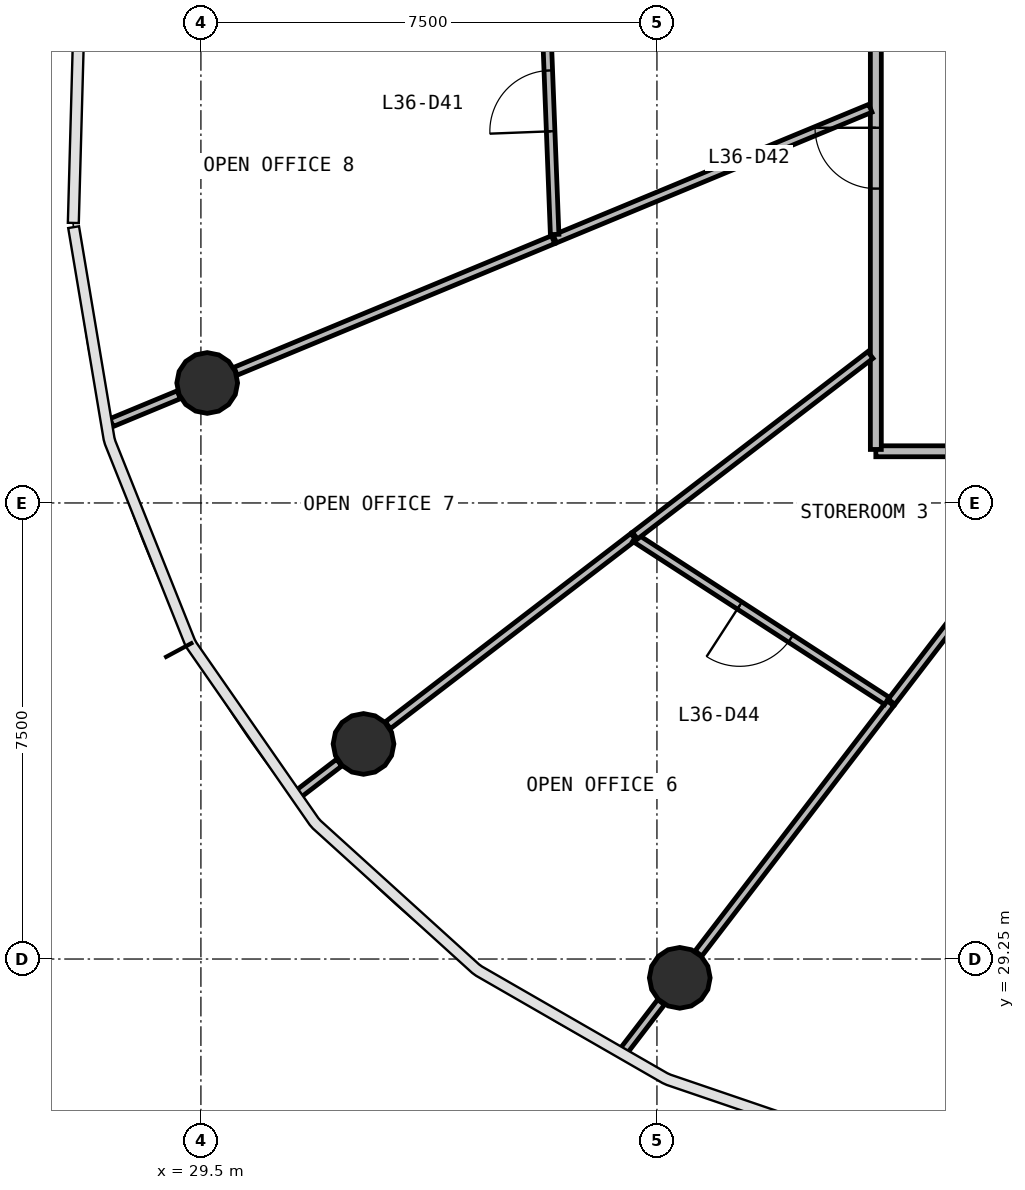
"""IFC4 building model, lengths in metres.
Left out: names, types, materials, properties, quantities, classifications, styles, units other than length and angle.
Written with IfcOpenShell. Run it as: python <this file> out.ifc"""

import sys

from ifc_helpers import new_model, si_unit, direction, frame, frame_2d, origin, origin_2d, place, context, subcontext, project, spatial, rectangle, circle, extrude, source, transform, mapped, element, fill, save


model = new_model("IFC4")
c1 = context("Model", 3, precision=1e-05, world=origin(), true_north=direction((0.0, 1.0)))
c2 = subcontext(c1, "Body", "Model", "MODEL_VIEW")
j1 = project(units=[si_unit("LENGTHUNIT", "METRE"), si_unit("PLANEANGLEUNIT", "RADIAN")], contexts=[c1])
p1 = place(None, origin())
s1 = spatial("IfcSite", under=j1, at=p1, CompositionType="ELEMENT")
p2 = place(p1, origin())
s2 = spatial("IfcBuilding", under=s1, at=p2, CompositionType="ELEMENT")
p3 = place(p2, frame((0.0, 0.0, 152.6)))
s3 = spatial("IfcBuildingStorey", under=s2, at=p3, CompositionType="ELEMENT", Elevation=152.6)
m1 = source(origin(), c2, "Body", "SweptSolid", [
    extrude(circle(Radius=0.5, at=origin_2d()), origin(), (0.0, 0.0, 1.0), 3.9),
])
for number, where, z_axis, x_axis in (
    (1, (29.603, 38.723, 0.0), (0.0, 0.0, 1.0), (1.0, 0.0, 0.0)),
    (2, (32.174, 32.787, 0.0), (0.0, 0.0, 1.0), (1.0, 0.0, 0.0)),
    (3, (37.375, 28.94, 0.0), (0.0, 0.0, 1.0), (1.0, 0.0, 0.0)),
):
    element("IfcColumn", number, at=place(p3, frame(where, z_axis=z_axis, x_axis=x_axis)), inside=s3, PredefinedType="COLUMN", context=c2, shape_type="MappedRepresentation", body=[
        mapped(m1, transform((0.0, 0.0, 0.0), scale=1.0)),
    ])
p4 = place(p3, frame((63.4, 37.6, 0.0), z_axis=(0.0, 0.0, 1.0), x_axis=(-1.0, 0.0, 0.0)))
e4 = element("IfcWall", 4, at=p4, inside=s3, PredefinedType="PARTITIONING", context=c2, shape_type="SweptSolid", body=[
    extrude(rectangle(XDim=22.8, YDim=0.18, at=frame_2d((11.4, 0.0))), origin(), (0.0, 0.0, 1.0), 2.88),
])
p5 = place(p4, frame((16.05, 0.0, 0.0)))
e5 = element("IfcOpeningElement", 5, at=p5, cuts=e4, PredefinedType="OPENING", context=c2, shape_type="SweptSolid", body=[
    extrude(rectangle(XDim=0.9, YDim=2.1, at=frame_2d((0.45, 1.05))), frame((0.0, 0.1, 0.0), z_axis=(0.0, -1.0, 0.0), x_axis=(1.0, 0.0, 0.0)), (0.0, 0.0, 1.0), 0.2),
])
p6 = place(p4, frame((13.05, 0.0, 0.0)))
e6 = element("IfcOpeningElement", 6, at=p6, cuts=e4, PredefinedType="OPENING", context=c2, shape_type="SweptSolid", body=[
    extrude(rectangle(XDim=0.9, YDim=2.1, at=frame_2d((0.45, 1.05))), frame((0.0, 0.1, 0.0), z_axis=(0.0, -1.0, 0.0), x_axis=(1.0, 0.0, 0.0)), (0.0, 0.0, 1.0), 0.2),
])
p7 = place(p4, frame((10.95, 0.0, 0.0)))
e7 = element("IfcOpeningElement", 7, at=p7, cuts=e4, PredefinedType="OPENING", context=c2, shape_type="SweptSolid", body=[
    extrude(rectangle(XDim=1.0, YDim=2.1, at=frame_2d((0.5, 1.05))), frame((0.0, 0.1, 0.0), z_axis=(0.0, -1.0, 0.0), x_axis=(1.0, 0.0, 0.0)), (0.0, 0.0, 1.0), 0.2),
])
p8 = place(p4, frame((19.95, 0.0, 0.0)))
e8 = element("IfcOpeningElement", 8, at=p8, cuts=e4, PredefinedType="OPENING", context=c2, shape_type="SweptSolid", body=[
    extrude(rectangle(XDim=1.0, YDim=2.1, at=frame_2d((0.5, 1.05))), frame((0.0, 0.1, 0.0), z_axis=(0.0, -1.0, 0.0), x_axis=(1.0, 0.0, 0.0)), (0.0, 0.0, 1.0), 0.2),
])
p9 = place(p3, frame((40.6, 37.63, 0.0), z_axis=(0.0, 0.0, 1.0), x_axis=(0.0, 1.0, 0.0)))
e9 = element("IfcWall", 9, at=p9, inside=s3, PredefinedType="PARTITIONING", context=c2, shape_type="SweptSolid", body=[
    extrude(rectangle(XDim=20.74, YDim=0.18, at=frame_2d((10.37, 0.0))), origin(), (0.0, 0.0, 1.0), 2.88),
])
p10 = place(p9, frame((9.89, 0.0, 0.0)))
e10 = element("IfcOpeningElement", 10, at=p10, cuts=e9, PredefinedType="OPENING", context=c2, shape_type="SweptSolid", body=[
    extrude(rectangle(XDim=1.0, YDim=2.1, at=frame_2d((0.5, 1.05))), frame((0.0, 0.1, 0.0), z_axis=(0.0, -1.0, 0.0), x_axis=(1.0, 0.0, 0.0)), (0.0, 0.0, 1.0), 0.2),
])
p11 = place(p9, frame((4.29, 0.0, 0.0)))
e11 = element("IfcOpeningElement", 11, at=p11, cuts=e9, PredefinedType="OPENING", context=c2, shape_type="SweptSolid", body=[
    extrude(rectangle(XDim=1.0, YDim=2.1, at=frame_2d((0.5, 1.05))), frame((0.0, 0.1, 0.0), z_axis=(0.0, -1.0, 0.0), x_axis=(1.0, 0.0, 0.0)), (0.0, 0.0, 1.0), 0.2),
])
p12 = place(p3, frame((40.51, 43.241, 0.0), z_axis=(0.0, 0.0, 1.0), x_axis=(-0.92387220975, -0.382701110597, 0.0)))
e12 = element("IfcWall", 12, at=p12, inside=s3, PredefinedType="PARTITIONING", context=c2, shape_type="SweptSolid", body=[
    extrude(rectangle(XDim=5.617, YDim=0.14, at=frame_2d((2.809, 0.0))), origin(), (0.0, 0.0, 1.0), 2.88),
])
p13 = place(p3, frame((35.293, 41.08, 0.0), z_axis=(0.0, 0.0, 1.0), x_axis=(-0.923883666289, -0.38267345239, 0.0)))
e13 = element("IfcWall", 13, at=p13, inside=s3, PredefinedType="PARTITIONING", context=c2, shape_type="SweptSolid", body=[
    extrude(rectangle(XDim=5.653, YDim=0.14, at=frame_2d((2.827, 0.0))), origin(), (0.0, 0.0, 1.0), 2.88),
])
p14 = place(p3, frame((40.841, 33.457, 0.0), z_axis=(0.0, 0.0, 1.0), x_axis=(-0.608780216018, -0.793338924159, 0.0)))
e14 = element("IfcWall", 14, at=p14, inside=s3, PredefinedType="PARTITIONING", context=c2, shape_type="SweptSolid", body=[
    extrude(rectangle(XDim=5.188, YDim=0.14, at=frame_2d((2.594, 0.0))), origin(), (0.0, 0.0, 1.0), 2.88),
])
p15 = place(p3, frame((36.614, 36.194, 0.0), z_axis=(0.0, 0.0, 1.0), x_axis=(-0.79337017358, -0.608739490811, 0.0)))
e15 = element("IfcWall", 15, at=p15, inside=s3, PredefinedType="PARTITIONING", context=c2, shape_type="SweptSolid", body=[
    extrude(rectangle(XDim=5.092, YDim=0.14, at=frame_2d((2.546, 0.0))), origin(), (0.0, 0.0, 1.0), 2.88),
])
p16 = place(p3, frame((40.782, 33.495, 0.0), z_axis=(0.0, 0.0, 1.0), x_axis=(-0.839336490457, 0.543612229247, 0.0)))
e16 = element("IfcWall", 16, at=p16, inside=s3, PredefinedType="PARTITIONING", context=c2, shape_type="SweptSolid", body=[
    extrude(rectangle(XDim=4.935, YDim=0.14, at=frame_2d((2.468, 0.0))), origin(), (0.0, 0.0, 1.0), 2.88),
])
p17 = place(p16, frame((1.885, 0.0, 0.0)))
e17 = element("IfcOpeningElement", 17, at=p17, cuts=e16, PredefinedType="OPENING", context=c2, shape_type="SweptSolid", body=[
    extrude(rectangle(XDim=1.0, YDim=2.1, at=frame_2d((0.5, 1.05))), frame((0.0, 0.08, 0.0), z_axis=(0.0, -1.0, 0.0), x_axis=(1.0, 0.0, 0.0)), (0.0, 0.0, 1.0), 0.16),
])
p18 = place(p3, frame((40.51, 39.183, 0.0), z_axis=(0.0, 0.0, 1.0), x_axis=(-0.793354275357, -0.608760210405, 0.0)))
e18 = element("IfcWall", 18, at=p18, inside=s3, PredefinedType="PARTITIONING", context=c2, shape_type="SweptSolid", body=[
    extrude(rectangle(XDim=4.88, YDim=0.14, at=frame_2d((2.44, 0.0))), origin(), (0.0, 0.0, 1.0), 2.88),
])
p19 = place(p3, frame((35.318, 41.166, 0.0), z_axis=(0.0, 0.0, 1.0), x_axis=(-0.038760942668, 0.999248512295, 0.0)))
e19 = element("IfcWall", 19, at=p19, inside=s3, PredefinedType="PARTITIONING", context=c2, shape_type="SweptSolid", body=[
    extrude(rectangle(XDim=4.548, YDim=0.14, at=frame_2d((2.274, 0.0))), origin(), (0.0, 0.0, 1.0), 2.88),
])
p20 = place(p19, frame((1.698, 0.0, 0.0)))
e20 = element("IfcOpeningElement", 20, at=p20, cuts=e19, PredefinedType="OPENING", context=c2, shape_type="SweptSolid", body=[
    extrude(rectangle(XDim=1.0, YDim=2.1, at=frame_2d((0.5, 1.05))), frame((0.0, 0.08, 0.0), z_axis=(0.0, -1.0, 0.0), x_axis=(1.0, 0.0, 0.0)), (0.0, 0.0, 1.0), 0.16),
])
p21 = place(p3, frame((42.033, 35.011, 0.0), z_axis=(0.0, 0.0, 1.0), x_axis=(-0.608750262105, -0.793361908833, 0.0)))
e21 = element("IfcWall", 21, at=p21, inside=s3, PredefinedType="PARTITIONING", context=c2, shape_type="SweptSolid", body=[
    extrude(rectangle(XDim=1.929, YDim=0.14, at=frame_2d((0.965, 0.0))), origin(), (0.0, 0.0, 1.0), 2.88),
])
p22 = place(p3, frame((29.137, 38.53, 0.0), z_axis=(0.0, 0.0, 1.0), x_axis=(-0.923882723383, -0.382675728829, 0.0)))
e22 = element("IfcWall", 22, at=p22, inside=s3, PredefinedType="PARTITIONING", context=c2, shape_type="SweptSolid", body=[
    extrude(rectangle(XDim=1.198, YDim=0.14, at=frame_2d((0.599, 0.0))), origin(), (0.0, 0.0, 1.0), 2.88),
])
p23 = place(p3, frame((37.068, 28.54, 0.0), z_axis=(0.0, 0.0, 1.0), x_axis=(-0.608815264587, -0.793312027897, 0.0)))
e23 = element("IfcWall", 23, at=p23, inside=s3, PredefinedType="PARTITIONING", context=c2, shape_type="SweptSolid", body=[
    extrude(rectangle(XDim=1.015, YDim=0.14, at=frame_2d((0.507, 0.0))), origin(), (0.0, 0.0, 1.0), 2.88),
])
p24 = place(p3, frame((31.774, 32.48, 0.0), z_axis=(0.0, 0.0, 1.0), x_axis=(-0.793296212725, -0.608835871871, 0.0)))
e24 = element("IfcWall", 24, at=p24, inside=s3, PredefinedType="PARTITIONING", context=c2, shape_type="SweptSolid", body=[
    extrude(rectangle(XDim=0.836, YDim=0.14, at=frame_2d((0.418, 0.0))), origin(), (0.0, 0.0, 1.0), 2.88),
])
m2 = source(origin(), c2, "Body", "SweptSolid", [
    extrude(rectangle(XDim=1.0, YDim=2.1, at=frame_2d((0.5, 1.05))), frame((0.0, 0.025, 0.0), z_axis=(0.0, -1.0, 0.0), x_axis=(1.0, 0.0, 0.0)), (0.0, 0.0, 1.0), 0.05),
])
p25 = place(p20, origin())
e25 = element("IfcDoor", 25, at=p25, inside=s3, OperationType="SINGLE_SWING_LEFT", PredefinedType="DOOR", context=c2, shape_type="MappedRepresentation", body=[
    mapped(m2, transform((0.0, 0.0, 0.0), scale=1.0)),
])
fill(e20, e25)
p26 = place(p11, origin())
e26 = element("IfcDoor", 26, at=p26, inside=s3, OperationType="SINGLE_SWING_RIGHT", PredefinedType="DOOR", context=c2, shape_type="MappedRepresentation", body=[
    mapped(m2, transform((0.0, 0.0, 0.0), scale=1.0)),
])
fill(e11, e26)
p27 = place(p17, origin())
e27 = element("IfcDoor", 27, at=p27, inside=s3, OperationType="SINGLE_SWING_RIGHT", PredefinedType="DOOR", context=c2, shape_type="MappedRepresentation", body=[
    mapped(m2, transform((0.0, 0.0, 0.0), scale=1.0)),
])
fill(e17, e27)
save(model, sys.argv[1])
